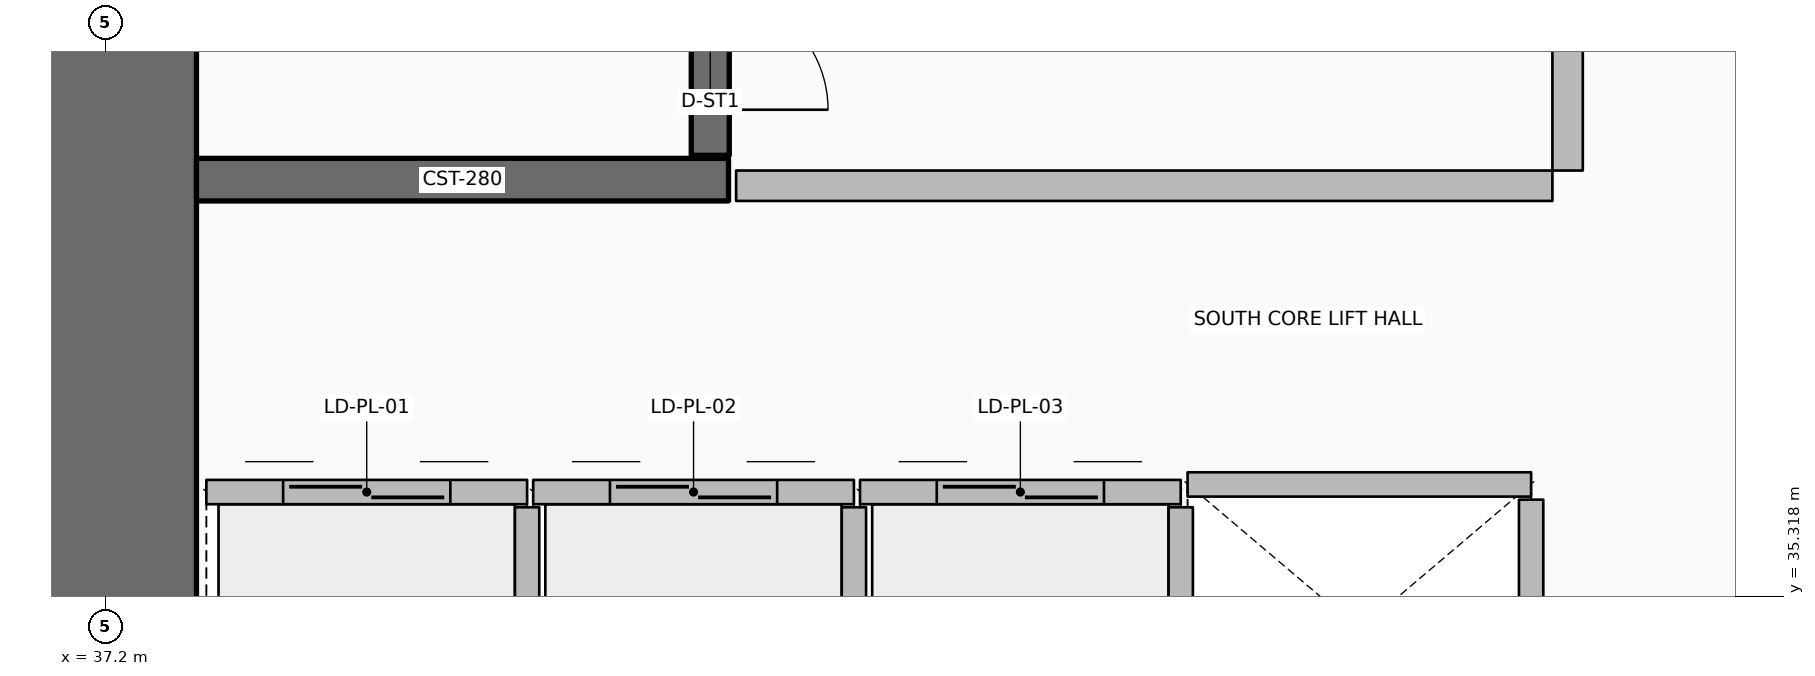
"""IFC4 building model, lengths in metres.
Left out: names, types, materials, properties, quantities, classifications, styles, units other than length and angle.
Written with IfcOpenShell. Run it as: python <this file> out.ifc"""

import sys

from ifc_helpers import new_model, si_unit, direction, frame, frame_2d, origin, place, context, subcontext, project, spatial, rectangle, extrude, element, fill, save


model = new_model("IFC4")
c1 = context("Model", 3, precision=1e-05, world=origin(), true_north=direction((0.0, 1.0)))
c2 = subcontext(c1, "Body", "Model", "MODEL_VIEW")
j1 = project(units=[si_unit("LENGTHUNIT", "METRE"), si_unit("PLANEANGLEUNIT", "RADIAN")], contexts=[c1])
p1 = place(None, origin())
s1 = spatial("IfcSite", under=j1, at=p1, CompositionType="ELEMENT")
p2 = place(p1, origin())
s2 = spatial("IfcBuilding", under=s1, at=p2, CompositionType="ELEMENT")
p3 = place(p2, frame((0.0, 0.0, 7.2)))
s3 = spatial("IfcBuildingStorey", under=s2, at=p3, CompositionType="ELEMENT", Elevation=7.2)
p4 = place(p3, frame((37.25, 34.0, 0.0), z_axis=(0.0, 0.0, 1.0), x_axis=(0.0, 1.0, 0.0)))
e1 = element("IfcWall", 1, at=p4, inside=s3, PredefinedType="SHEAR", context=c2, shape_type="SweptSolid", body=[
    extrude(rectangle(XDim=16.0, YDim=1.1, at=frame_2d((8.0, 0.0))), origin(), (0.0, 0.0, 1.0), 4.8),
])
p5 = place(p3, frame((37.8, 38.06, 0.0), z_axis=(0.0, 0.0, 1.0), x_axis=(1.0, 0.0, 0.0)))
e2 = element("IfcWall", 2, at=p5, inside=s3, PredefinedType="SHEAR", context=c2, shape_type="SweptSolid", body=[
    extrude(rectangle(XDim=3.5, YDim=0.28, at=frame_2d((1.75, 0.0))), origin(), (0.0, 0.0, 1.0), 4.8),
])
p6 = place(p3, frame((41.18, 38.22, 0.0), z_axis=(0.0, 0.0, 1.0), x_axis=(0.0, 1.0, 0.0)))
e3 = element("IfcWall", 3, at=p6, inside=s3, PredefinedType="SOLIDWALL", context=c2, shape_type="SweptSolid", body=[
    extrude(rectangle(XDim=7.56, YDim=0.25, at=frame_2d((3.78, 0.0))), origin(), (0.0, 0.0, 1.0), 4.48),
])
p7 = place(p6, frame((0.3, 0.0, 0.0)))
e4 = element("IfcOpeningElement", 4, at=p7, cuts=e3, PredefinedType="OPENING", context=c2, shape_type="SweptSolid", body=[
    extrude(rectangle(XDim=1.55, YDim=2.15, at=frame_2d((0.775, 1.075))), frame((0.0, 0.135, 0.0), z_axis=(0.0, -1.0, 0.0), x_axis=(1.0, 0.0, 0.0)), (0.0, 0.0, 1.0), 0.27),
])
p8 = place(p3, frame((37.865, 36.005, 0.0), z_axis=(0.0, 0.0, 1.0), x_axis=(1.0, 0.0, 0.0)))
e5 = element("IfcWall", 5, at=p8, inside=s3, PredefinedType="PARTITIONING", context=c2, shape_type="SweptSolid", body=[
    extrude(rectangle(XDim=2.11, YDim=0.16, at=frame_2d((1.055, 0.0))), origin(), (0.0, 0.0, 1.0), 4.48),
])
p9 = place(p8, frame((0.505, 0.0, 0.0)))
e6 = element("IfcOpeningElement", 6, at=p9, cuts=e5, PredefinedType="OPENING", context=c2, shape_type="SweptSolid", body=[
    extrude(rectangle(XDim=1.1, YDim=2.1, at=frame_2d((0.55, 1.05))), frame((0.0, 0.09, 0.0), z_axis=(0.0, -1.0, 0.0), x_axis=(1.0, 0.0, 0.0)), (0.0, 0.0, 1.0), 0.18),
])
p10 = place(p3, frame((39.975, 34.295, 0.0), z_axis=(0.0, 0.0, 1.0), x_axis=(0.0, 1.0, 0.0)))
e7 = element("IfcWall", 7, at=p10, inside=s3, PredefinedType="PARTITIONING", context=c2, shape_type="SweptSolid", body=[
    extrude(rectangle(XDim=1.61, YDim=0.16, at=frame_2d((0.805, 0.0))), origin(), (0.0, 0.0, 1.0), 4.48),
])
p11 = place(p3, frame((40.015, 36.005, 0.0), z_axis=(0.0, 0.0, 1.0), x_axis=(1.0, 0.0, 0.0)))
e8 = element("IfcWall", 8, at=p11, inside=s3, PredefinedType="PARTITIONING", context=c2, shape_type="SweptSolid", body=[
    extrude(rectangle(XDim=2.11, YDim=0.16, at=frame_2d((1.055, 0.0))), origin(), (0.0, 0.0, 1.0), 4.48),
])
p12 = place(p11, frame((0.505, 0.0, 0.0)))
e9 = element("IfcOpeningElement", 9, at=p12, cuts=e8, PredefinedType="OPENING", context=c2, shape_type="SweptSolid", body=[
    extrude(rectangle(XDim=1.1, YDim=2.1, at=frame_2d((0.55, 1.05))), frame((0.0, 0.09, 0.0), z_axis=(0.0, -1.0, 0.0), x_axis=(1.0, 0.0, 0.0)), (0.0, 0.0, 1.0), 0.18),
])
p13 = place(p3, frame((42.125, 34.295, 0.0), z_axis=(0.0, 0.0, 1.0), x_axis=(0.0, 1.0, 0.0)))
e10 = element("IfcWall", 10, at=p13, inside=s3, PredefinedType="PARTITIONING", context=c2, shape_type="SweptSolid", body=[
    extrude(rectangle(XDim=1.61, YDim=0.16, at=frame_2d((0.805, 0.0))), origin(), (0.0, 0.0, 1.0), 4.48),
])
p14 = place(p3, frame((42.165, 36.005, 0.0), z_axis=(0.0, 0.0, 1.0), x_axis=(1.0, 0.0, 0.0)))
e11 = element("IfcWall", 11, at=p14, inside=s3, PredefinedType="PARTITIONING", context=c2, shape_type="SweptSolid", body=[
    extrude(rectangle(XDim=2.11, YDim=0.16, at=frame_2d((1.055, 0.0))), origin(), (0.0, 0.0, 1.0), 4.48),
])
p15 = place(p14, frame((0.505, 0.0, 0.0)))
e12 = element("IfcOpeningElement", 12, at=p15, cuts=e11, PredefinedType="OPENING", context=c2, shape_type="SweptSolid", body=[
    extrude(rectangle(XDim=1.1, YDim=2.1, at=frame_2d((0.55, 1.05))), frame((0.0, 0.09, 0.0), z_axis=(0.0, -1.0, 0.0), x_axis=(1.0, 0.0, 0.0)), (0.0, 0.0, 1.0), 0.18),
])
p16 = place(p3, frame((44.275, 34.295, 0.0), z_axis=(0.0, 0.0, 1.0), x_axis=(0.0, 1.0, 0.0)))
e13 = element("IfcWall", 13, at=p16, inside=s3, PredefinedType="PARTITIONING", context=c2, shape_type="SweptSolid", body=[
    extrude(rectangle(XDim=1.61, YDim=0.16, at=frame_2d((0.805, 0.0))), origin(), (0.0, 0.0, 1.0), 4.48),
])
p17 = place(p3, frame((44.32, 36.055, 0.0), z_axis=(0.0, 0.0, 1.0), x_axis=(1.0, 0.0, 0.0)))
e14 = element("IfcWall", 14, at=p17, inside=s3, PredefinedType="PARTITIONING", context=c2, shape_type="SweptSolid", body=[
    extrude(rectangle(XDim=2.26, YDim=0.16, at=frame_2d((1.13, 0.0))), origin(), (0.0, 0.0, 1.0), 4.48),
])
p18 = place(p3, frame((46.58, 34.245, 0.0), z_axis=(0.0, 0.0, 1.0), x_axis=(0.0, 1.0, 0.0)))
e15 = element("IfcWall", 15, at=p18, inside=s3, PredefinedType="PARTITIONING", context=c2, shape_type="SweptSolid", body=[
    extrude(rectangle(XDim=1.71, YDim=0.16, at=frame_2d((0.855, 0.0))), origin(), (0.0, 0.0, 1.0), 4.48),
])
p19 = place(p3, frame((41.35, 38.02, 0.0), z_axis=(0.0, 0.0, 1.0), x_axis=(1.0, 0.0, 0.0)))
e16 = element("IfcWall", 16, at=p19, inside=s3, PredefinedType="PARTITIONING", context=c2, shape_type="SweptSolid", body=[
    extrude(rectangle(XDim=5.37, YDim=0.2, at=frame_2d((2.685, 0.0))), origin(), (0.0, 0.0, 1.0), 4.48),
])
p20 = place(p3, frame((46.82, 38.12, 0.0), z_axis=(0.0, 0.0, 1.0), x_axis=(0.0, 1.0, 0.0)))
e17 = element("IfcWall", 17, at=p20, inside=s3, PredefinedType="PARTITIONING", context=c2, shape_type="SweptSolid", body=[
    extrude(rectangle(XDim=3.26, YDim=0.2, at=frame_2d((1.63, 0.0))), origin(), (0.0, 0.0, 1.0), 4.48),
])
p21 = place(p20, frame((1.105, 0.0, 0.0)))
e18 = element("IfcOpeningElement", 18, at=p21, cuts=e17, PredefinedType="OPENING", context=c2, shape_type="SweptSolid", body=[
    extrude(rectangle(XDim=1.05, YDim=2.1, at=frame_2d((0.525, 1.05))), frame((0.0, 0.11, 0.0), z_axis=(0.0, -1.0, 0.0), x_axis=(1.0, 0.0, 0.0)), (0.0, 0.0, 1.0), 0.22),
])
p22 = place(p7, origin())
e19 = element("IfcDoor", 19, at=p22, inside=s3, OperationType="DOUBLE_DOOR_SINGLE_SWING", PredefinedType="DOOR", context=c2, shape_type="SweptSolid", body=[
    extrude(rectangle(XDim=1.55, YDim=2.15, at=frame_2d((0.775, 1.075))), frame((0.0, 0.025, 0.0), z_axis=(0.0, -1.0, 0.0), x_axis=(1.0, 0.0, 0.0)), (0.0, 0.0, 1.0), 0.05),
])
fill(e4, e19)
p23 = place(p9, origin())
e20 = element("IfcDoor", 20, at=p23, inside=s3, OperationType="DOUBLE_DOOR_SLIDING", PredefinedType="DOOR", context=c2, shape_type="SweptSolid", body=[
    extrude(rectangle(XDim=1.1, YDim=2.1, at=frame_2d((0.55, 1.05))), frame((0.0, 0.025, 0.0), z_axis=(0.0, -1.0, 0.0), x_axis=(1.0, 0.0, 0.0)), (0.0, 0.0, 1.0), 0.05),
])
fill(e6, e20)
p24 = place(p12, origin())
e21 = element("IfcDoor", 21, at=p24, inside=s3, OperationType="DOUBLE_DOOR_SLIDING", PredefinedType="DOOR", context=c2, shape_type="SweptSolid", body=[
    extrude(rectangle(XDim=1.1, YDim=2.1, at=frame_2d((0.55, 1.05))), frame((0.0, 0.025, 0.0), z_axis=(0.0, -1.0, 0.0), x_axis=(1.0, 0.0, 0.0)), (0.0, 0.0, 1.0), 0.05),
])
fill(e9, e21)
p25 = place(p15, origin())
e22 = element("IfcDoor", 22, at=p25, inside=s3, OperationType="DOUBLE_DOOR_SLIDING", PredefinedType="DOOR", context=c2, shape_type="SweptSolid", body=[
    extrude(rectangle(XDim=1.1, YDim=2.1, at=frame_2d((0.55, 1.05))), frame((0.0, 0.025, 0.0), z_axis=(0.0, -1.0, 0.0), x_axis=(1.0, 0.0, 0.0)), (0.0, 0.0, 1.0), 0.05),
])
fill(e12, e22)
save(model, sys.argv[1])
